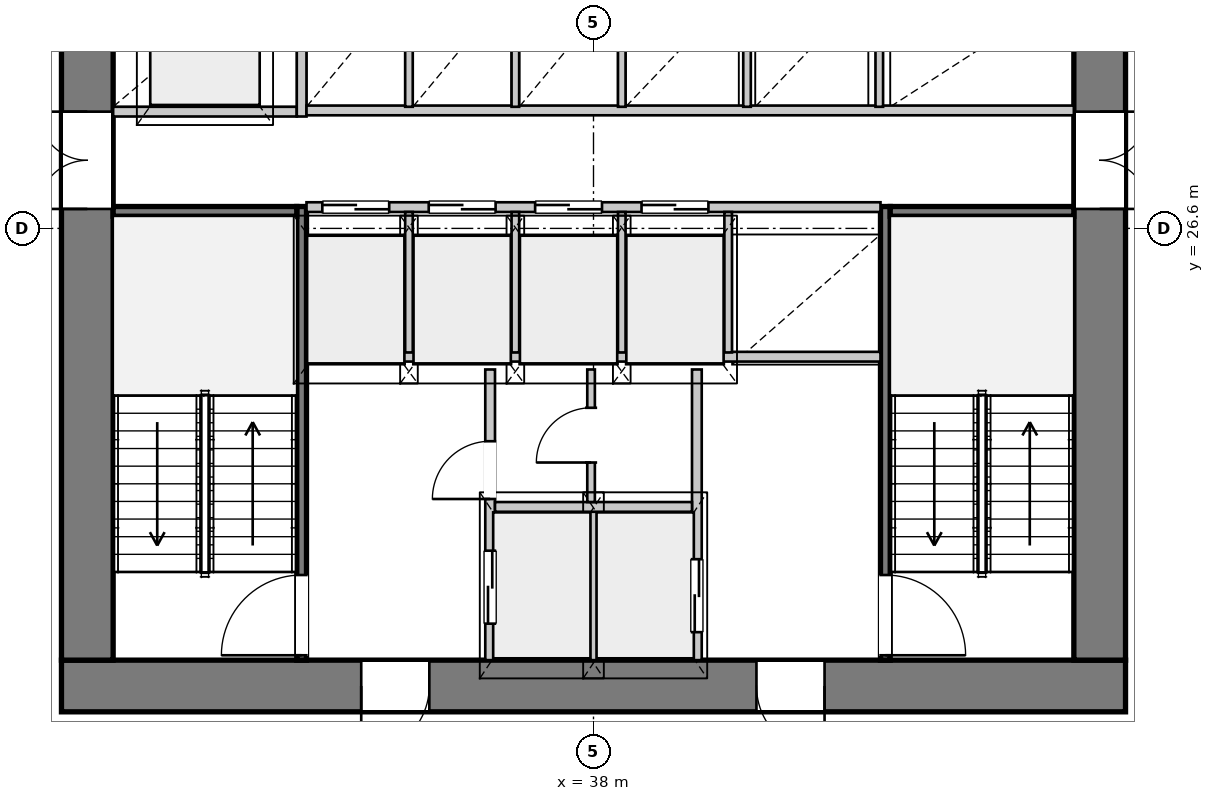
"""IFC4 building model, lengths in metres.
Left out: names, types, materials, properties, quantities, classifications, styles, units other than length and angle.
Written with IfcOpenShell. Run it as: python <this file> out.ifc"""

import sys

from ifc_helpers import new_model, si_unit, direction, frame, frame_2d, origin, place, context, subcontext, project, spatial, rectangle, extrude, source, transform, mapped, element, fill, save


model = new_model("IFC4")
c1 = context("Model", 3, precision=1e-05, world=origin(), true_north=direction((0.0, 1.0)))
c2 = subcontext(c1, "Body", "Model", "MODEL_VIEW")
j1 = project(units=[si_unit("LENGTHUNIT", "METRE"), si_unit("PLANEANGLEUNIT", "RADIAN")], contexts=[c1])
p1 = place(None, origin())
s1 = spatial("IfcSite", under=j1, at=p1, CompositionType="ELEMENT")
p2 = place(p1, origin())
s2 = spatial("IfcBuilding", under=s1, at=p2, CompositionType="ELEMENT")
p3 = place(p2, frame((0.0, 0.0, 68.35)))
s3 = spatial("IfcBuildingStorey", under=s2, at=p3, CompositionType="ELEMENT", Elevation=68.35)
p4 = place(p3, frame((46.75, 19.075, 0.0), z_axis=(0.0, 0.0, 1.0), x_axis=(-1.0, 0.0, 0.0)))
e1 = element("IfcWall", 1, at=p4, inside=s3, PredefinedType="SHEAR", context=c2, shape_type="SweptSolid", body=[
    extrude(rectangle(XDim=17.5, YDim=0.85, at=frame_2d((8.75, 0.0))), origin(), (0.0, 0.0, 1.0), 3.3),
])
p5 = place(p4, frame((4.95, 0.0, 0.0)))
e2 = element("IfcOpeningElement", 2, at=p5, cuts=e1, PredefinedType="OPENING", context=c2, shape_type="SweptSolid", body=[
    extrude(rectangle(XDim=1.12, YDim=2.25, at=frame_2d((0.56, 1.125))), frame((0.0, 0.435, 0.0), z_axis=(0.0, -1.0, 0.0), x_axis=(1.0, 0.0, 0.0)), (0.0, 0.0, 1.0), 0.87),
])
p6 = place(p4, frame((11.45, 0.0, 0.0)))
e3 = element("IfcOpeningElement", 3, at=p6, cuts=e1, PredefinedType="OPENING", context=c2, shape_type="SweptSolid", body=[
    extrude(rectangle(XDim=1.12, YDim=2.25, at=frame_2d((0.56, 1.125))), frame((0.0, 0.435, 0.0), z_axis=(0.0, -1.0, 0.0), x_axis=(1.0, 0.0, 0.0)), (0.0, 0.0, 1.0), 0.87),
])
p7 = place(p3, frame((29.675, 19.5, 0.0), z_axis=(0.0, 0.0, 1.0), x_axis=(0.0, 1.0, 0.0)))
e4 = element("IfcWall", 4, at=p7, inside=s3, PredefinedType="SHEAR", context=c2, shape_type="SweptSolid", body=[
    extrude(rectangle(XDim=14.2, YDim=0.85, at=frame_2d((7.1, 0.0))), origin(), (0.0, 0.0, 1.0), 3.3),
])
p8 = place(p7, frame((7.42, 0.0, 0.0)))
e5 = element("IfcOpeningElement", 5, at=p8, cuts=e4, PredefinedType="OPENING", context=c2, shape_type="SweptSolid", body=[
    extrude(rectangle(XDim=1.6, YDim=2.2, at=frame_2d((0.8, 1.1))), frame((0.0, 0.435, 0.0), z_axis=(0.0, -1.0, 0.0), x_axis=(1.0, 0.0, 0.0)), (0.0, 0.0, 1.0), 0.87),
])
p9 = place(p3, frame((46.325, 33.7, 0.0), z_axis=(0.0, 0.0, 1.0), x_axis=(0.0, -1.0, 0.0)))
e6 = element("IfcWall", 6, at=p9, inside=s3, PredefinedType="SHEAR", context=c2, shape_type="SweptSolid", body=[
    extrude(rectangle(XDim=14.2, YDim=0.85, at=frame_2d((7.1, 0.0))), origin(), (0.0, 0.0, 1.0), 3.3),
])
p10 = place(p9, frame((5.18, 0.0, 0.0)))
e7 = element("IfcOpeningElement", 7, at=p10, cuts=e6, PredefinedType="OPENING", context=c2, shape_type="SweptSolid", body=[
    extrude(rectangle(XDim=1.6, YDim=2.2, at=frame_2d((0.8, 1.1))), frame((0.0, 0.435, 0.0), z_axis=(0.0, -1.0, 0.0), x_axis=(1.0, 0.0, 0.0)), (0.0, 0.0, 1.0), 0.87),
])
p11 = place(p3, frame((33.2, 19.5, 0.0), z_axis=(0.0, 0.0, 1.0), x_axis=(0.0, 1.0, 0.0)))
e8 = element("IfcWall", 8, at=p11, inside=s3, PredefinedType="PARTITIONING", context=c2, shape_type="SweptSolid", body=[
    extrude(rectangle(XDim=7.46, YDim=0.16, at=frame_2d((3.73, 0.0))), origin(), (0.0, 0.0, 1.0), 3.3),
])
p12 = place(p11, frame((0.08, 0.0, 0.0)))
e9 = element("IfcOpeningElement", 9, at=p12, cuts=e8, PredefinedType="OPENING", context=c2, shape_type="SweptSolid", body=[
    extrude(rectangle(XDim=1.32, YDim=2.2, at=frame_2d((0.66, 1.1))), frame((0.0, 0.09, 0.0), z_axis=(0.0, -1.0, 0.0), x_axis=(1.0, 0.0, 0.0)), (0.0, 0.0, 1.0), 0.18),
])
p13 = place(p3, frame((30.1, 26.88, 0.0), z_axis=(0.0, 0.0, 1.0), x_axis=(1.0, 0.0, 0.0)))
e10 = element("IfcWall", 10, at=p13, inside=s3, PredefinedType="PARTITIONING", context=c2, shape_type="SweptSolid", body=[
    extrude(rectangle(XDim=3.02, YDim=0.16, at=frame_2d((1.51, 0.0))), origin(), (0.0, 0.0, 1.0), 3.3),
])
p14 = place(p3, frame((42.8, 26.96, 0.0), z_axis=(0.0, 0.0, 1.0), x_axis=(0.0, -1.0, 0.0)))
e11 = element("IfcWall", 11, at=p14, inside=s3, PredefinedType="PARTITIONING", context=c2, shape_type="SweptSolid", body=[
    extrude(rectangle(XDim=7.46, YDim=0.16, at=frame_2d((3.73, 0.0))), origin(), (0.0, 0.0, 1.0), 3.3),
])
p15 = place(p14, frame((6.06, 0.0, 0.0)))
e12 = element("IfcOpeningElement", 12, at=p15, cuts=e11, PredefinedType="OPENING", context=c2, shape_type="SweptSolid", body=[
    extrude(rectangle(XDim=1.32, YDim=2.2, at=frame_2d((0.66, 1.1))), frame((0.0, 0.09, 0.0), z_axis=(0.0, -1.0, 0.0), x_axis=(1.0, 0.0, 0.0)), (0.0, 0.0, 1.0), 0.18),
])
p16 = place(p3, frame((42.88, 26.88, 0.0), z_axis=(0.0, 0.0, 1.0), x_axis=(1.0, 0.0, 0.0)))
e13 = element("IfcWall", 13, at=p16, inside=s3, PredefinedType="PARTITIONING", context=c2, shape_type="SweptSolid", body=[
    extrude(rectangle(XDim=3.02, YDim=0.16, at=frame_2d((1.51, 0.0))), origin(), (0.0, 0.0, 1.0), 3.3),
])
p17 = place(p3, frame((36.3, 19.5, 0.0), z_axis=(0.0, 0.0, 1.0), x_axis=(0.0, 1.0, 0.0)))
e14 = element("IfcWall", 14, at=p17, inside=s3, PredefinedType="PARTITIONING", context=c2, shape_type="SweptSolid", body=[
    extrude(rectangle(XDim=4.78, YDim=0.16, at=frame_2d((2.39, 0.0))), origin(), (0.0, 0.0, 1.0), 3.3),
])
p18 = place(p17, frame((0.6, 0.0, 0.0)))
e15 = element("IfcOpeningElement", 15, at=p18, cuts=e14, PredefinedType="OPENING", context=c2, shape_type="SweptSolid", body=[
    extrude(rectangle(XDim=1.2, YDim=2.2, at=frame_2d((0.6, 1.1))), frame((0.0, 0.09, 0.0), z_axis=(0.0, -1.0, 0.0), x_axis=(1.0, 0.0, 0.0)), (0.0, 0.0, 1.0), 0.18),
])
p19 = place(p17, frame((2.65, 0.0, 0.0)))
e16 = element("IfcOpeningElement", 16, at=p19, cuts=e14, PredefinedType="OPENING", context=c2, shape_type="SweptSolid", body=[
    extrude(rectangle(XDim=0.95, YDim=2.1, at=frame_2d((0.475, 1.05))), frame((0.0, 0.09, 0.0), z_axis=(0.0, -1.0, 0.0), x_axis=(1.0, 0.0, 0.0)), (0.0, 0.0, 1.0), 0.18),
])
p20 = place(p3, frame((39.7, 24.28, 0.0), z_axis=(0.0, 0.0, 1.0), x_axis=(0.0, -1.0, 0.0)))
e17 = element("IfcWall", 17, at=p20, inside=s3, PredefinedType="PARTITIONING", context=c2, shape_type="SweptSolid", body=[
    extrude(rectangle(XDim=4.78, YDim=0.16, at=frame_2d((2.39, 0.0))), origin(), (0.0, 0.0, 1.0), 3.3),
])
p21 = place(p20, frame((3.12, 0.0, 0.0)))
e18 = element("IfcOpeningElement", 18, at=p21, cuts=e17, PredefinedType="OPENING", context=c2, shape_type="SweptSolid", body=[
    extrude(rectangle(XDim=1.2, YDim=2.2, at=frame_2d((0.6, 1.1))), frame((0.0, 0.09, 0.0), z_axis=(0.0, -1.0, 0.0), x_axis=(1.0, 0.0, 0.0)), (0.0, 0.0, 1.0), 0.18),
])
p22 = place(p3, frame((38.0, 19.5, 0.0), z_axis=(0.0, 0.0, 1.0), x_axis=(0.0, 1.0, 0.0)))
e19 = element("IfcWall", 19, at=p22, inside=s3, PredefinedType="PARTITIONING", context=c2, shape_type="SweptSolid", body=[
    extrude(rectangle(XDim=2.46, YDim=0.125, at=frame_2d((1.23, 0.0))), origin(), (0.0, 0.0, 1.0), 3.3),
])
p23 = place(p3, frame((36.38, 22.02, 0.0), z_axis=(0.0, 0.0, 1.0), x_axis=(1.0, 0.0, 0.0)))
e20 = element("IfcWall", 20, at=p23, inside=s3, PredefinedType="PARTITIONING", context=c2, shape_type="SweptSolid", body=[
    extrude(rectangle(XDim=3.24, YDim=0.16, at=frame_2d((1.62, 0.0))), origin(), (0.0, 0.0, 1.0), 3.3),
])
p24 = place(p3, frame((33.28, 24.49, 0.0), z_axis=(0.0, 0.0, 1.0), x_axis=(1.0, 0.0, 0.0)))
e21 = element("IfcWall", 21, at=p24, inside=s3, PredefinedType="PARTITIONING", context=c2, shape_type="SweptSolid", body=[
    extrude(rectangle(XDim=9.44, YDim=0.16, at=frame_2d((4.72, 0.0))), origin(), (0.0, 0.0, 1.0), 3.3),
])
p25 = place(p3, frame((37.96, 22.1, 0.0), z_axis=(0.0, 0.0, 1.0), x_axis=(0.0, 1.0, 0.0)))
e22 = element("IfcWall", 22, at=p25, inside=s3, PredefinedType="PARTITIONING", context=c2, shape_type="SweptSolid", body=[
    extrude(rectangle(XDim=2.18, YDim=0.125, at=frame_2d((1.09, 0.0))), origin(), (0.0, 0.0, 1.0), 3.3),
])
p26 = place(p25, frame((0.65, 0.0, 0.0)))
e23 = element("IfcOpeningElement", 23, at=p26, cuts=e22, PredefinedType="OPENING", context=c2, shape_type="SweptSolid", body=[
    extrude(rectangle(XDim=0.9, YDim=2.1, at=frame_2d((0.45, 1.05))), frame((0.0, 0.073, 0.0), z_axis=(0.0, -1.0, 0.0), x_axis=(1.0, 0.0, 0.0)), (0.0, 0.0, 1.0), 0.145),
])
p27 = place(p3, frame((30.1, 28.52, 0.0), z_axis=(0.0, 0.0, 1.0), x_axis=(1.0, 0.0, 0.0)))
e24 = element("IfcWall", 24, at=p27, inside=s3, PredefinedType="PARTITIONING", context=c2, shape_type="SweptSolid", body=[
    extrude(rectangle(XDim=3.02, YDim=0.16, at=frame_2d((1.51, 0.0))), origin(), (0.0, 0.0, 1.0), 3.3),
])
p28 = place(p3, frame((33.2, 28.44, 0.0), z_axis=(0.0, 0.0, 1.0), x_axis=(0.0, 1.0, 0.0)))
e25 = element("IfcWall", 25, at=p28, inside=s3, PredefinedType="PARTITIONING", context=c2, shape_type="SweptSolid", body=[
    extrude(rectangle(XDim=5.26, YDim=0.16, at=frame_2d((2.63, 0.0))), origin(), (0.0, 0.0, 1.0), 3.3),
])
p29 = place(p3, frame((33.28, 26.95, 0.0), z_axis=(0.0, 0.0, 1.0), x_axis=(1.0, 0.0, 0.0)))
e26 = element("IfcWall", 26, at=p29, inside=s3, PredefinedType="PARTITIONING", context=c2, shape_type="SweptSolid", body=[
    extrude(rectangle(XDim=9.44, YDim=0.16, at=frame_2d((4.72, 0.0))), origin(), (0.0, 0.0, 1.0), 3.3),
])
p30 = place(p29, frame((0.26, 0.0, 0.0)))
e27 = element("IfcOpeningElement", 27, at=p30, cuts=e26, PredefinedType="OPENING", context=c2, shape_type="SweptSolid", body=[
    extrude(rectangle(XDim=1.1, YDim=2.2, at=frame_2d((0.55, 1.1))), frame((0.0, 0.09, 0.0), z_axis=(0.0, -1.0, 0.0), x_axis=(1.0, 0.0, 0.0)), (0.0, 0.0, 1.0), 0.18),
])
p31 = place(p29, frame((2.01, 0.0, 0.0)))
e28 = element("IfcOpeningElement", 28, at=p31, cuts=e26, PredefinedType="OPENING", context=c2, shape_type="SweptSolid", body=[
    extrude(rectangle(XDim=1.1, YDim=2.2, at=frame_2d((0.55, 1.1))), frame((0.0, 0.09, 0.0), z_axis=(0.0, -1.0, 0.0), x_axis=(1.0, 0.0, 0.0)), (0.0, 0.0, 1.0), 0.18),
])
p32 = place(p29, frame((3.76, 0.0, 0.0)))
e29 = element("IfcOpeningElement", 29, at=p32, cuts=e26, PredefinedType="OPENING", context=c2, shape_type="SweptSolid", body=[
    extrude(rectangle(XDim=1.1, YDim=2.2, at=frame_2d((0.55, 1.1))), frame((0.0, 0.09, 0.0), z_axis=(0.0, -1.0, 0.0), x_axis=(1.0, 0.0, 0.0)), (0.0, 0.0, 1.0), 0.18),
])
p33 = place(p29, frame((5.51, 0.0, 0.0)))
e30 = element("IfcOpeningElement", 30, at=p33, cuts=e26, PredefinedType="OPENING", context=c2, shape_type="SweptSolid", body=[
    extrude(rectangle(XDim=1.1, YDim=2.2, at=frame_2d((0.55, 1.1))), frame((0.0, 0.09, 0.0), z_axis=(0.0, -1.0, 0.0), x_axis=(1.0, 0.0, 0.0)), (0.0, 0.0, 1.0), 0.18),
])
for number, where, z_axis, x_axis in (
    (31, (34.965, 24.56, 0.0), (0.0, 0.0, 1.0), (0.0, 1.0, 0.0)),
    (32, (36.715, 24.56, 0.0), (0.0, 0.0, 1.0), (0.0, 1.0, 0.0)),
    (33, (38.465, 24.56, 0.0), (0.0, 0.0, 1.0), (0.0, 1.0, 0.0)),
    (34, (40.215, 24.56, 0.0), (0.0, 0.0, 1.0), (0.0, 1.0, 0.0)),
):
    element("IfcWall", number, at=place(p3, frame(where, z_axis=z_axis, x_axis=x_axis)), inside=s3, PredefinedType="PARTITIONING", context=c2, shape_type="SweptSolid", body=[
        extrude(rectangle(XDim=2.31, YDim=0.125, at=frame_2d((1.155, 0.0))), origin(), (0.0, 0.0, 1.0), 3.3),
    ])
p34 = place(p3, frame((33.28, 28.54, 0.0), z_axis=(0.0, 0.0, 1.0), x_axis=(1.0, 0.0, 0.0)))
e35 = element("IfcWall", 35, at=p34, inside=s3, PredefinedType="PARTITIONING", context=c2, shape_type="SweptSolid", body=[
    extrude(rectangle(XDim=12.62, YDim=0.16, at=frame_2d((6.31, 0.0))), origin(), (0.0, 0.0, 1.0), 3.3),
])
for number, where, z_axis, x_axis in (
    (36, (34.965, 28.6, 0.0), (0.0, 0.0, 1.0), (0.0, 1.0, 0.0)),
    (37, (36.715, 28.6, 0.0), (0.0, 0.0, 1.0), (0.0, 1.0, 0.0)),
    (38, (38.465, 28.6, 0.0), (0.0, 0.0, 1.0), (0.0, 1.0, 0.0)),
    (39, (40.525, 28.6, 0.0), (0.0, 0.0, 1.0), (0.0, 1.0, 0.0)),
    (40, (42.7, 28.6, 0.0), (0.0, 0.0, 1.0), (0.0, 1.0, 0.0)),
):
    element("IfcWall", number, at=place(p3, frame(where, z_axis=z_axis, x_axis=x_axis)), inside=s3, PredefinedType="PARTITIONING", context=c2, shape_type="SweptSolid", body=[
        extrude(rectangle(XDim=1.92, YDim=0.125, at=frame_2d((0.96, 0.0))), origin(), (0.0, 0.0, 1.0), 3.3),
    ])
m1 = source(origin(), c2, "Body", "SweptSolid", [
    extrude(rectangle(XDim=1.12, YDim=2.25, at=frame_2d((0.56, 1.125))), frame((0.0, 0.025, 0.0), z_axis=(0.0, -1.0, 0.0), x_axis=(1.0, 0.0, 0.0)), (0.0, 0.0, 1.0), 0.05),
])
p35 = place(p5, origin())
e41 = element("IfcDoor", 41, at=p35, inside=s3, OperationType="SINGLE_SWING_LEFT", PredefinedType="DOOR", context=c2, shape_type="MappedRepresentation", body=[
    mapped(m1, transform((0.0, 0.0, 0.0), x_axis=(1.0, 0.0, 0.0), y_axis=(0.0, 1.0, 0.0), z_axis=(0.0, 0.0, 1.0), scale=1.0)),
])
fill(e2, e41)
p36 = place(p6, origin())
e42 = element("IfcDoor", 42, at=p36, inside=s3, OperationType="SINGLE_SWING_RIGHT", PredefinedType="DOOR", context=c2, shape_type="MappedRepresentation", body=[
    mapped(m1, transform((0.0, 0.0, 0.0), x_axis=(1.0, 0.0, 0.0), y_axis=(0.0, 1.0, 0.0), z_axis=(0.0, 0.0, 1.0), scale=1.0)),
])
fill(e3, e42)
m2 = source(origin(), c2, "Body", "SweptSolid", [
    extrude(rectangle(XDim=1.6, YDim=2.2, at=frame_2d((0.8, 1.1))), frame((0.0, 0.025, 0.0), z_axis=(0.0, -1.0, 0.0), x_axis=(1.0, 0.0, 0.0)), (0.0, 0.0, 1.0), 0.05),
])
p37 = place(p8, origin())
e43 = element("IfcDoor", 43, at=p37, inside=s3, OperationType="DOUBLE_DOOR_SINGLE_SWING", PredefinedType="DOOR", context=c2, shape_type="MappedRepresentation", body=[
    mapped(m2, transform((0.0, 0.0, 0.0), x_axis=(1.0, 0.0, 0.0), y_axis=(0.0, 1.0, 0.0), z_axis=(0.0, 0.0, 1.0), scale=1.0)),
])
fill(e5, e43)
p38 = place(p10, origin())
e44 = element("IfcDoor", 44, at=p38, inside=s3, OperationType="DOUBLE_DOOR_SINGLE_SWING", PredefinedType="DOOR", context=c2, shape_type="MappedRepresentation", body=[
    mapped(m2, transform((0.0, 0.0, 0.0), x_axis=(1.0, 0.0, 0.0), y_axis=(0.0, 1.0, 0.0), z_axis=(0.0, 0.0, 1.0), scale=1.0)),
])
fill(e7, e44)
m3 = source(origin(), c2, "Body", "SweptSolid", [
    extrude(rectangle(XDim=1.32, YDim=2.2, at=frame_2d((0.66, 1.1))), frame((0.0, 0.025, 0.0), z_axis=(0.0, -1.0, 0.0), x_axis=(1.0, 0.0, 0.0)), (0.0, 0.0, 1.0), 0.05),
])
p39 = place(p12, origin())
e45 = element("IfcDoor", 45, at=p39, inside=s3, OperationType="SINGLE_SWING_LEFT", PredefinedType="DOOR", context=c2, shape_type="MappedRepresentation", body=[
    mapped(m3, transform((0.0, 0.0, 0.0), x_axis=(1.0, 0.0, 0.0), y_axis=(0.0, 1.0, 0.0), z_axis=(0.0, 0.0, 1.0), scale=1.0)),
])
fill(e9, e45)
p40 = place(p15, origin())
e46 = element("IfcDoor", 46, at=p40, inside=s3, OperationType="SINGLE_SWING_RIGHT", PredefinedType="DOOR", context=c2, shape_type="MappedRepresentation", body=[
    mapped(m3, transform((0.0, 0.0, 0.0), x_axis=(1.0, 0.0, 0.0), y_axis=(0.0, 1.0, 0.0), z_axis=(0.0, 0.0, 1.0), scale=1.0)),
])
fill(e12, e46)
m4 = source(origin(), c2, "Body", "SweptSolid", [
    extrude(rectangle(XDim=1.2, YDim=2.2, at=frame_2d((0.6, 1.1))), frame((0.0, 0.025, 0.0), z_axis=(0.0, -1.0, 0.0), x_axis=(1.0, 0.0, 0.0)), (0.0, 0.0, 1.0), 0.05),
])
p41 = place(p18, origin())
e47 = element("IfcDoor", 47, at=p41, inside=s3, OperationType="DOUBLE_DOOR_SLIDING", PredefinedType="DOOR", context=c2, shape_type="MappedRepresentation", body=[
    mapped(m4, transform((0.0, 0.0, 0.0), x_axis=(1.0, 0.0, 0.0), y_axis=(0.0, 1.0, 0.0), z_axis=(0.0, 0.0, 1.0), scale=1.0)),
])
fill(e15, e47)
m5 = source(origin(), c2, "Body", "SweptSolid", [
    extrude(rectangle(XDim=0.95, YDim=2.1, at=frame_2d((0.475, 1.05))), frame((0.0, 0.025, 0.0), z_axis=(0.0, -1.0, 0.0), x_axis=(1.0, 0.0, 0.0)), (0.0, 0.0, 1.0), 0.05),
])
p42 = place(p19, origin())
e48 = element("IfcDoor", 48, at=p42, inside=s3, OperationType="SINGLE_SWING_LEFT", PredefinedType="DOOR", context=c2, shape_type="MappedRepresentation", body=[
    mapped(m5, transform((0.0, 0.0, 0.0), x_axis=(1.0, 0.0, 0.0), y_axis=(0.0, 1.0, 0.0), z_axis=(0.0, 0.0, 1.0), scale=1.0)),
])
fill(e16, e48)
m6 = source(origin(), c2, "Body", "SweptSolid", [
    extrude(rectangle(XDim=0.9, YDim=2.1, at=frame_2d((0.45, 1.05))), frame((0.0, 0.025, 0.0), z_axis=(0.0, -1.0, 0.0), x_axis=(1.0, 0.0, 0.0)), (0.0, 0.0, 1.0), 0.05),
])
p43 = place(p26, origin())
e49 = element("IfcDoor", 49, at=p43, inside=s3, OperationType="SINGLE_SWING_LEFT", PredefinedType="DOOR", context=c2, shape_type="MappedRepresentation", body=[
    mapped(m6, transform((0.0, 0.0, 0.0), x_axis=(1.0, 0.0, 0.0), y_axis=(0.0, 1.0, 0.0), z_axis=(0.0, 0.0, 1.0), scale=1.0)),
])
fill(e23, e49)
p44 = place(p21, origin())
e50 = element("IfcDoor", 50, at=p44, inside=s3, OperationType="DOUBLE_DOOR_SLIDING", PredefinedType="DOOR", context=c2, shape_type="MappedRepresentation", body=[
    mapped(m4, transform((0.0, 0.0, 0.0), x_axis=(1.0, 0.0, 0.0), y_axis=(0.0, 1.0, 0.0), z_axis=(0.0, 0.0, 1.0), scale=1.0)),
])
fill(e18, e50)
m7 = source(origin(), c2, "Body", "SweptSolid", [
    extrude(rectangle(XDim=1.1, YDim=2.2, at=frame_2d((0.55, 1.1))), frame((0.0, 0.025, 0.0), z_axis=(0.0, -1.0, 0.0), x_axis=(1.0, 0.0, 0.0)), (0.0, 0.0, 1.0), 0.05),
])
p45 = place(p30, origin())
e51 = element("IfcDoor", 51, at=p45, inside=s3, OperationType="DOUBLE_DOOR_SLIDING", PredefinedType="DOOR", context=c2, shape_type="MappedRepresentation", body=[
    mapped(m7, transform((0.0, 0.0, 0.0), x_axis=(1.0, 0.0, 0.0), y_axis=(0.0, 1.0, 0.0), z_axis=(0.0, 0.0, 1.0), scale=1.0)),
])
fill(e27, e51)
p46 = place(p31, origin())
e52 = element("IfcDoor", 52, at=p46, inside=s3, OperationType="DOUBLE_DOOR_SLIDING", PredefinedType="DOOR", context=c2, shape_type="MappedRepresentation", body=[
    mapped(m7, transform((0.0, 0.0, 0.0), x_axis=(1.0, 0.0, 0.0), y_axis=(0.0, 1.0, 0.0), z_axis=(0.0, 0.0, 1.0), scale=1.0)),
])
fill(e28, e52)
p47 = place(p32, origin())
e53 = element("IfcDoor", 53, at=p47, inside=s3, OperationType="DOUBLE_DOOR_SLIDING", PredefinedType="DOOR", context=c2, shape_type="MappedRepresentation", body=[
    mapped(m7, transform((0.0, 0.0, 0.0), x_axis=(1.0, 0.0, 0.0), y_axis=(0.0, 1.0, 0.0), z_axis=(0.0, 0.0, 1.0), scale=1.0)),
])
fill(e29, e53)
p48 = place(p33, origin())
e54 = element("IfcDoor", 54, at=p48, inside=s3, OperationType="DOUBLE_DOOR_SLIDING", PredefinedType="DOOR", context=c2, shape_type="MappedRepresentation", body=[
    mapped(m7, transform((0.0, 0.0, 0.0), x_axis=(1.0, 0.0, 0.0), y_axis=(0.0, 1.0, 0.0), z_axis=(0.0, 0.0, 1.0), scale=1.0)),
])
fill(e30, e54)
save(model, sys.argv[1])
